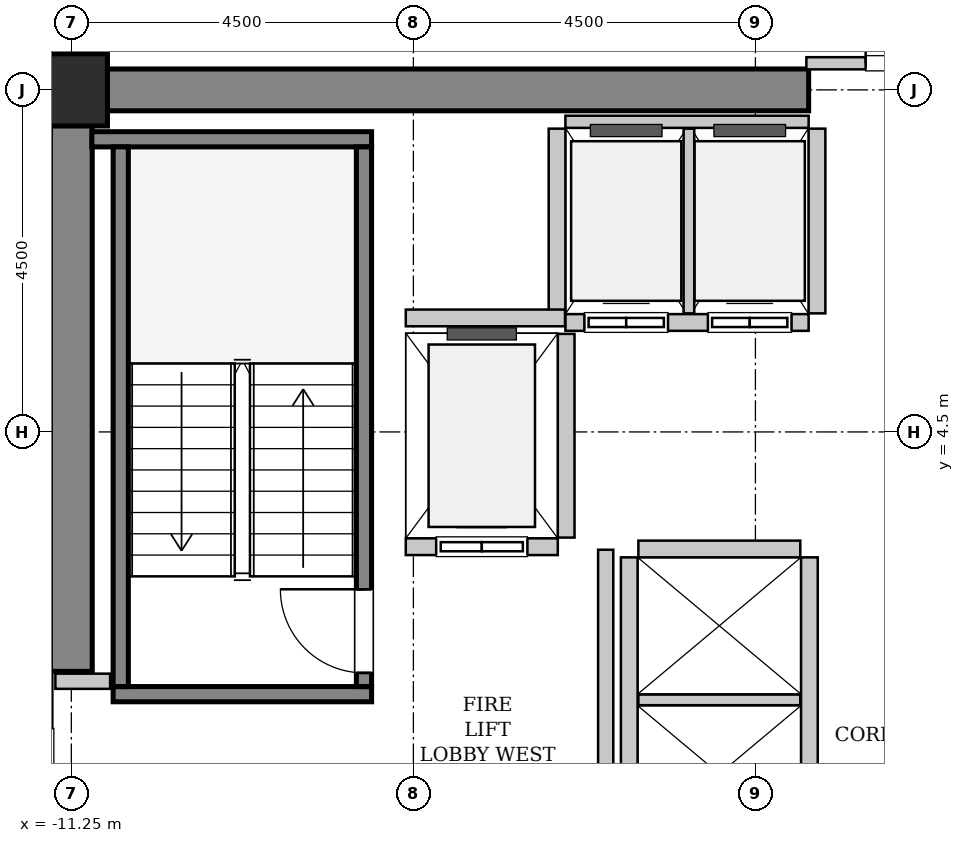
"""IFC4 building model, lengths in metres.
Left out: names, types, materials, properties, quantities, classifications, styles, units other than length and angle.
Written with IfcOpenShell. Run it as: python <this file> out.ifc"""

import sys

from ifc_helpers import new_model, si_unit, direction, frame, frame_2d, origin, origin_2d, place, context, subcontext, project, spatial, rectangle, hollow_rectangle, extrude, source, transform, mapped, element, fill, save


model = new_model("IFC4")
c1 = context("Model", 3, precision=1e-05, world=origin(), true_north=direction((0.0, 1.0)))
c2 = subcontext(c1, "Body", "Model", "MODEL_VIEW")
j1 = project(units=[si_unit("LENGTHUNIT", "METRE"), si_unit("PLANEANGLEUNIT", "RADIAN")], contexts=[c1])
p1 = place(None, origin())
s1 = spatial("IfcSite", under=j1, at=p1, CompositionType="ELEMENT")
p2 = place(p1, origin())
s2 = spatial("IfcBuilding", under=s1, at=p2, CompositionType="ELEMENT")
p3 = place(p2, frame((0.0, 0.0, 94.6)))
s3 = spatial("IfcBuildingStorey", under=s2, at=p3, CompositionType="ELEMENT", Elevation=94.6)
m1 = source(origin(), c2, "Body", "SweptSolid", [
    extrude(rectangle(XDim=9.975, YDim=0.55, at=frame_2d((4.987, 0.0))), origin(), (0.0, 0.0, 1.0), 3.8),
])
p4 = place(p3, frame((-11.525, 9.0, 0.0), z_axis=(0.0, 0.0, 1.0), x_axis=(1.0, 0.0, 0.0)))
e1 = element("IfcWall", 1, at=p4, inside=s3, PredefinedType="SHEAR", context=c2, shape_type="MappedRepresentation", body=[
    mapped(m1, transform((0.0, 0.0, 0.0), x_axis=(1.0, 0.0, 0.0), y_axis=(0.0, 1.0, 0.0), z_axis=(0.0, 0.0, 1.0), scale=1.0)),
])
m2 = source(origin(), c2, "Body", "SweptSolid", [
    extrude(rectangle(XDim=7.375, YDim=0.55, at=frame_2d((3.688, 0.0))), origin(), (0.0, 0.0, 1.0), 3.8),
])
p5 = place(p3, frame((-11.25, 1.35, 0.0), z_axis=(0.0, 0.0, 1.0), x_axis=(0.0, 1.0, 0.0)))
e2 = element("IfcWall", 2, at=p5, inside=s3, PredefinedType="SHEAR", context=c2, shape_type="MappedRepresentation", body=[
    mapped(m2, transform((0.0, 0.0, 0.0), x_axis=(1.0, 0.0, 0.0), y_axis=(0.0, 1.0, 0.0), z_axis=(0.0, 0.0, 1.0), scale=1.0)),
])
m3 = source(origin(), c2, "Body", "SweptSolid", [
    extrude(hollow_rectangle(XDim=0.95, YDim=0.95, WallThickness=0.045, InnerFilletRadius=0.045, OuterFilletRadius=0.09, at=origin_2d()), origin(), (0.0, 0.0, 1.0), 3.8),
])
p6 = place(p3, frame((-11.25, 9.0, 0.0), z_axis=(0.0, 0.0, 1.0), x_axis=(1.0, 0.0, 0.0)))
e3 = element("IfcColumn", 3, at=p6, inside=s3, PredefinedType="COLUMN", context=c2, shape_type="MappedRepresentation", body=[
    mapped(m3, transform((0.0, 0.0, 0.0), x_axis=(1.0, 0.0, 0.0), y_axis=(0.0, 1.0, 0.0), z_axis=(0.0, 0.0, 1.0), scale=1.0)),
])
m4 = source(origin(), c2, "Body", "SweptSolid", [
    extrude(rectangle(XDim=3.4, YDim=0.2, at=frame_2d((1.7, 0.0))), origin(), (0.0, 0.0, 1.0), 3.8),
])
p7 = place(p3, frame((-7.3, 1.05, 0.0), z_axis=(0.0, 0.0, 1.0), x_axis=(-1.0, 0.0, 0.0)))
e4 = element("IfcWall", 4, at=p7, inside=s3, PredefinedType="SOLIDWALL", context=c2, shape_type="MappedRepresentation", body=[
    mapped(m4, transform((0.0, 0.0, 0.0), x_axis=(1.0, 0.0, 0.0), y_axis=(0.0, 1.0, 0.0), z_axis=(0.0, 0.0, 1.0), scale=1.0)),
])
m5 = source(origin(), c2, "Body", "SweptSolid", [
    extrude(rectangle(XDim=3.68, YDim=0.2, at=frame_2d((1.84, 0.0))), origin(), (0.0, 0.0, 1.0), 3.8),
])
p8 = place(p3, frame((-7.3, 8.35, 0.0), z_axis=(0.0, 0.0, 1.0), x_axis=(-1.0, 0.0, 0.0)))
e5 = element("IfcWall", 5, at=p8, inside=s3, PredefinedType="SOLIDWALL", context=c2, shape_type="MappedRepresentation", body=[
    mapped(m5, transform((0.0, 0.0, 0.0), x_axis=(1.0, 0.0, 0.0), y_axis=(0.0, 1.0, 0.0), z_axis=(0.0, 0.0, 1.0), scale=1.0)),
])
m6 = source(origin(), c2, "Body", "SweptSolid", [
    extrude(rectangle(XDim=7.1, YDim=0.2, at=frame_2d((3.55, 0.0))), origin(), (0.0, 0.0, 1.0), 3.8),
])
p9 = place(p3, frame((-7.4, 1.15, 0.0), z_axis=(0.0, 0.0, 1.0), x_axis=(0.0, 1.0, 0.0)))
e6 = element("IfcWall", 6, at=p9, inside=s3, PredefinedType="SOLIDWALL", context=c2, shape_type="MappedRepresentation", body=[
    mapped(m6, transform((0.0, 0.0, 0.0), x_axis=(1.0, 0.0, 0.0), y_axis=(0.0, 1.0, 0.0), z_axis=(0.0, 0.0, 1.0), scale=1.0)),
])
p10 = place(p9, frame((0.18, 0.0, 0.0)))
e7 = element("IfcOpeningElement", 7, at=p10, cuts=e6, PredefinedType="OPENING", context=c2, shape_type="SweptSolid", body=[
    extrude(rectangle(XDim=1.1, YDim=2.15, at=frame_2d((0.55, 1.075))), frame((0.0, 0.11, 0.0), z_axis=(0.0, -1.0, 0.0), x_axis=(1.0, 0.0, 0.0)), (0.0, 0.0, 1.0), 0.22),
])
p11 = place(p3, frame((-10.6, 1.15, 0.0), z_axis=(0.0, 0.0, 1.0), x_axis=(0.0, 1.0, 0.0)))
e8 = element("IfcWall", 8, at=p11, inside=s3, PredefinedType="SOLIDWALL", context=c2, shape_type="MappedRepresentation", body=[
    mapped(m6, transform((0.0, 0.0, 0.0), x_axis=(1.0, 0.0, 0.0), y_axis=(0.0, 1.0, 0.0), z_axis=(0.0, 0.0, 1.0), scale=1.0)),
])
m7 = source(origin(), c2, "Body", "SweptSolid", [
    extrude(rectangle(XDim=2.0, YDim=0.22, at=frame_2d((1.0, 0.0))), origin(), (0.0, 0.0, 1.0), 3.535),
])
p12 = place(p3, frame((-6.85, 2.99, 0.0), z_axis=(0.0, 0.0, 1.0), x_axis=(1.0, 0.0, 0.0)))
e9 = element("IfcWall", 9, at=p12, inside=s3, PredefinedType="SOLIDWALL", context=c2, shape_type="MappedRepresentation", body=[
    mapped(m7, transform((0.0, 0.0, 0.0), x_axis=(1.0, 0.0, 0.0), y_axis=(0.0, 1.0, 0.0), z_axis=(0.0, 0.0, 1.0), scale=1.0)),
])
p13 = place(p12, frame((0.4, 0.0, 0.0)))
e10 = element("IfcOpeningElement", 10, at=p13, cuts=e9, PredefinedType="OPENING", context=c2, shape_type="SweptSolid", body=[
    extrude(rectangle(XDim=1.2, YDim=2.2, at=frame_2d((0.6, 1.1))), frame((0.0, 0.12, 0.0), z_axis=(0.0, -1.0, 0.0), x_axis=(1.0, 0.0, 0.0)), (0.0, 0.0, 1.0), 0.24),
])
m8 = source(origin(), c2, "Body", "SweptSolid", [
    extrude(rectangle(XDim=2.68, YDim=0.22, at=frame_2d((1.34, 0.0))), origin(), (0.0, 0.0, 1.0), 3.535),
])
p14 = place(p3, frame((-4.74, 3.11, 0.0), z_axis=(0.0, 0.0, 1.0), x_axis=(0.0, 1.0, 0.0)))
e11 = element("IfcWall", 11, at=p14, inside=s3, PredefinedType="SOLIDWALL", context=c2, shape_type="MappedRepresentation", body=[
    mapped(m8, transform((0.0, 0.0, 0.0), x_axis=(1.0, 0.0, 0.0), y_axis=(0.0, 1.0, 0.0), z_axis=(0.0, 0.0, 1.0), scale=1.0)),
])
m9 = source(origin(), c2, "Body", "SweptSolid", [
    extrude(rectangle(XDim=3.2, YDim=0.22, at=frame_2d((1.6, 0.0))), origin(), (0.0, 0.0, 1.0), 3.535),
])
p15 = place(p3, frame((-4.75, 5.94, 0.0), z_axis=(0.0, 0.0, 1.0), x_axis=(1.0, 0.0, 0.0)))
e12 = element("IfcWall", 12, at=p15, inside=s3, PredefinedType="SOLIDWALL", context=c2, shape_type="MappedRepresentation", body=[
    mapped(m9, transform((0.0, 0.0, 0.0), x_axis=(1.0, 0.0, 0.0), y_axis=(0.0, 1.0, 0.0), z_axis=(0.0, 0.0, 1.0), scale=1.0)),
])
p16 = place(p15, frame((0.25, 0.0, 0.0)))
e13 = element("IfcOpeningElement", 13, at=p16, cuts=e12, PredefinedType="OPENING", context=c2, shape_type="SweptSolid", body=[
    extrude(rectangle(XDim=1.1, YDim=2.2, at=frame_2d((0.55, 1.1))), frame((0.0, 0.12, 0.0), z_axis=(0.0, -1.0, 0.0), x_axis=(1.0, 0.0, 0.0)), (0.0, 0.0, 1.0), 0.24),
])
p17 = place(p15, frame((1.875, 0.0, 0.0)))
e14 = element("IfcOpeningElement", 14, at=p17, cuts=e12, PredefinedType="OPENING", context=c2, shape_type="SweptSolid", body=[
    extrude(rectangle(XDim=1.1, YDim=2.2, at=frame_2d((0.55, 1.1))), frame((0.0, 0.12, 0.0), z_axis=(0.0, -1.0, 0.0), x_axis=(1.0, 0.0, 0.0)), (0.0, 0.0, 1.0), 0.24),
])
m10 = source(origin(), c2, "Body", "SweptSolid", [
    extrude(rectangle(XDim=3.2, YDim=0.16, at=frame_2d((1.6, 0.0))), origin(), (0.0, 0.0, 1.0), 2.425),
])
p18 = place(p3, frame((-1.55, 8.58, 0.0), z_axis=(0.0, 0.0, 1.0), x_axis=(-1.0, 0.0, 0.0)))
e15 = element("IfcWall", 15, at=p18, inside=s3, PredefinedType="PARTITIONING", context=c2, shape_type="MappedRepresentation", body=[
    mapped(m10, transform((0.0, 0.0, 0.0), x_axis=(1.0, 0.0, 0.0), y_axis=(0.0, 1.0, 0.0), z_axis=(0.0, 0.0, 1.0), scale=1.0)),
])
m11 = source(origin(), c2, "Body", "SweptSolid", [
    extrude(rectangle(XDim=2.43, YDim=0.22, at=frame_2d((1.215, 0.0))), origin(), (0.0, 0.0, 1.0), 3.535),
])
p19 = place(p3, frame((-4.86, 8.49, 0.0), z_axis=(0.0, 0.0, 1.0), x_axis=(0.0, -1.0, 0.0)))
e16 = element("IfcWall", 16, at=p19, inside=s3, PredefinedType="SOLIDWALL", context=c2, shape_type="MappedRepresentation", body=[
    mapped(m11, transform((0.0, 0.0, 0.0), x_axis=(1.0, 0.0, 0.0), y_axis=(0.0, 1.0, 0.0), z_axis=(0.0, 0.0, 1.0), scale=1.0)),
])
m12 = source(origin(), c2, "Body", "SweptSolid", [
    extrude(rectangle(XDim=2.43, YDim=0.14, at=frame_2d((1.215, 0.0))), origin(), (0.0, 0.0, 1.0), 3.535),
])
p20 = place(p3, frame((-3.125, 6.06, 0.0), z_axis=(0.0, 0.0, 1.0), x_axis=(0.0, 1.0, 0.0)))
e17 = element("IfcWall", 17, at=p20, inside=s3, PredefinedType="PARTITIONING", context=c2, shape_type="MappedRepresentation", body=[
    mapped(m12, transform((0.0, 0.0, 0.0), x_axis=(1.0, 0.0, 0.0), y_axis=(0.0, 1.0, 0.0), z_axis=(0.0, 0.0, 1.0), scale=1.0)),
])
p21 = place(p3, frame((-1.44, 6.06, 0.0), z_axis=(0.0, 0.0, 1.0), x_axis=(0.0, 1.0, 0.0)))
e18 = element("IfcWall", 18, at=p21, inside=s3, PredefinedType="SOLIDWALL", context=c2, shape_type="MappedRepresentation", body=[
    mapped(m11, transform((0.0, 0.0, 0.0), x_axis=(1.0, 0.0, 0.0), y_axis=(0.0, 1.0, 0.0), z_axis=(0.0, 0.0, 1.0), scale=1.0)),
])
m13 = source(origin(), c2, "Body", "SweptSolid", [
    extrude(rectangle(XDim=5.7, YDim=0.22, at=frame_2d((2.85, 0.0))), origin(), (0.0, 0.0, 1.0), 3.535),
])
for number, where, z_axis, x_axis in (
    (19, (-1.54, -2.85, 0.0), (0.0, 0.0, 1.0), (0.0, 1.0, 0.0)),
    (20, (-3.91, 2.85, 0.0), (0.0, 0.0, 1.0), (0.0, -1.0, 0.0)),
):
    element("IfcWall", number, at=place(p3, frame(where, z_axis=z_axis, x_axis=x_axis)), inside=s3, PredefinedType="SOLIDWALL", context=c2, shape_type="MappedRepresentation", body=[
        mapped(m13, transform((0.0, 0.0, 0.0), x_axis=(1.0, 0.0, 0.0), y_axis=(0.0, 1.0, 0.0), z_axis=(0.0, 0.0, 1.0), scale=1.0)),
    ])
m14 = source(origin(), c2, "Body", "SweptSolid", [
    extrude(rectangle(XDim=2.13, YDim=0.14, at=frame_2d((1.065, 0.0))), origin(), (0.0, 0.0, 1.0), 3.535),
])
p22 = place(p3, frame((-3.79, 0.975, 0.0), z_axis=(0.0, 0.0, 1.0), x_axis=(1.0, 0.0, 0.0)))
e21 = element("IfcWall", 21, at=p22, inside=s3, PredefinedType="PARTITIONING", context=c2, shape_type="MappedRepresentation", body=[
    mapped(m14, transform((0.0, 0.0, 0.0), x_axis=(1.0, 0.0, 0.0), y_axis=(0.0, 1.0, 0.0), z_axis=(0.0, 0.0, 1.0), scale=1.0)),
])
m15 = source(origin(), c2, "Body", "SweptSolid", [
    extrude(rectangle(XDim=2.13, YDim=0.22, at=frame_2d((1.065, 0.0))), origin(), (0.0, 0.0, 1.0), 3.535),
])
p23 = place(p3, frame((-1.66, 2.96, 0.0), z_axis=(0.0, 0.0, 1.0), x_axis=(-1.0, 0.0, 0.0)))
e22 = element("IfcWall", 22, at=p23, inside=s3, PredefinedType="SOLIDWALL", context=c2, shape_type="MappedRepresentation", body=[
    mapped(m15, transform((0.0, 0.0, 0.0), x_axis=(1.0, 0.0, 0.0), y_axis=(0.0, 1.0, 0.0), z_axis=(0.0, 0.0, 1.0), scale=1.0)),
])
m16 = source(origin(), c2, "Body", "SweptSolid", [
    extrude(rectangle(XDim=2.095, YDim=0.22, at=frame_2d((1.048, 0.0))), origin(), (0.0, 0.0, 1.0), 3.535),
])
p24 = place(p3, frame((-6.85, 6.0, 0.0), z_axis=(0.0, 0.0, 1.0), x_axis=(1.0, 0.0, 0.0)))
e23 = element("IfcWall", 23, at=p24, inside=s3, PredefinedType="SOLIDWALL", context=c2, shape_type="MappedRepresentation", body=[
    mapped(m16, transform((0.0, 0.0, 0.0), x_axis=(1.0, 0.0, 0.0), y_axis=(0.0, 1.0, 0.0), z_axis=(0.0, 0.0, 1.0), scale=1.0)),
])
m17 = source(origin(), c2, "Body", "SweptSolid", [
    extrude(rectangle(XDim=5.9, YDim=0.2, at=frame_2d((2.95, 0.0))), origin(), (0.0, 0.0, 1.0), 3.535),
])
p25 = place(p3, frame((-4.22, -2.95, 0.0), z_axis=(0.0, 0.0, 1.0), x_axis=(0.0, 1.0, 0.0)))
e24 = element("IfcWall", 24, at=p25, inside=s3, PredefinedType="PARTITIONING", context=c2, shape_type="MappedRepresentation", body=[
    mapped(m17, transform((0.0, 0.0, 0.0), x_axis=(1.0, 0.0, 0.0), y_axis=(0.0, 1.0, 0.0), z_axis=(0.0, 0.0, 1.0), scale=1.0)),
])
m18 = source(origin(), c2, "Body", "SweptSolid", [
    extrude(rectangle(XDim=0.72, YDim=0.2, at=frame_2d((0.36, 0.0))), origin(), (0.0, 0.0, 1.0), 3.535),
])
p26 = place(p3, frame((-11.46, 1.22, 0.0), z_axis=(0.0, 0.0, 1.0), x_axis=(1.0, 0.0, 0.0)))
e25 = element("IfcWall", 25, at=p26, inside=s3, PredefinedType="PARTITIONING", context=c2, shape_type="MappedRepresentation", body=[
    mapped(m18, transform((0.0, 0.0, 0.0), x_axis=(1.0, 0.0, 0.0), y_axis=(0.0, 1.0, 0.0), z_axis=(0.0, 0.0, 1.0), scale=1.0)),
])
m19 = source(origin(), c2, "Body", "SweptSolid", [
    extrude(rectangle(XDim=3.16, YDim=0.16, at=frame_2d((1.58, 0.0))), origin(), (0.0, 0.0, 1.0), 2.425),
])
p27 = place(p3, frame((-1.58, 9.35, 0.0), z_axis=(0.0, 0.0, 1.0), x_axis=(1.0, 0.0, 0.0)))
e26 = element("IfcWall", 26, at=p27, inside=s3, PredefinedType="PARTITIONING", context=c2, shape_type="MappedRepresentation", body=[
    mapped(m19, transform((0.0, 0.0, 0.0), x_axis=(1.0, 0.0, 0.0), y_axis=(0.0, 1.0, 0.0), z_axis=(0.0, 0.0, 1.0), scale=1.0)),
])
p28 = place(p27, frame((0.78, 0.0, 0.0)))
e27 = element("IfcOpeningElement", 27, at=p28, cuts=e26, PredefinedType="OPENING", context=c2, shape_type="SweptSolid", body=[
    extrude(rectangle(XDim=1.6, YDim=2.3, at=frame_2d((0.8, 1.15))), frame((0.0, 0.09, 0.0), z_axis=(0.0, -1.0, 0.0), x_axis=(1.0, 0.0, 0.0)), (0.0, 0.0, 1.0), 0.18),
])
m20 = source(origin(), c2, "Body", "SweptSolid", [
    extrude(rectangle(XDim=1.1, YDim=2.15, at=frame_2d((0.55, 1.075))), frame((0.0, 0.025, 0.0), z_axis=(0.0, -1.0, 0.0), x_axis=(1.0, 0.0, 0.0)), (0.0, 0.0, 1.0), 0.05),
])
p29 = place(p10, origin())
e28 = element("IfcDoor", 28, at=p29, inside=s3, OperationType="SINGLE_SWING_RIGHT", PredefinedType="DOOR", context=c2, shape_type="MappedRepresentation", body=[
    mapped(m20, transform((0.0, 0.0, 0.0), x_axis=(1.0, 0.0, 0.0), y_axis=(0.0, 1.0, 0.0), z_axis=(0.0, 0.0, 1.0), scale=1.0)),
])
fill(e7, e28)
m21 = source(origin(), c2, "Body", "SweptSolid", [
    extrude(rectangle(XDim=1.2, YDim=2.2, at=frame_2d((0.6, 1.1))), frame((0.0, 0.025, 0.0), z_axis=(0.0, -1.0, 0.0), x_axis=(1.0, 0.0, 0.0)), (0.0, 0.0, 1.0), 0.05),
])
p30 = place(p13, origin())
e29 = element("IfcDoor", 29, at=p30, inside=s3, OperationType="SLIDING_TO_LEFT", PredefinedType="DOOR", context=c2, shape_type="MappedRepresentation", body=[
    mapped(m21, transform((0.0, 0.0, 0.0), x_axis=(1.0, 0.0, 0.0), y_axis=(0.0, 1.0, 0.0), z_axis=(0.0, 0.0, 1.0), scale=1.0)),
])
fill(e10, e29)
m22 = source(origin(), c2, "Body", "SweptSolid", [
    extrude(rectangle(XDim=1.1, YDim=2.2, at=frame_2d((0.55, 1.1))), frame((0.0, 0.025, 0.0), z_axis=(0.0, -1.0, 0.0), x_axis=(1.0, 0.0, 0.0)), (0.0, 0.0, 1.0), 0.05),
])
p31 = place(p16, origin())
e30 = element("IfcDoor", 30, at=p31, inside=s3, OperationType="DOUBLE_DOOR_SLIDING", PredefinedType="DOOR", context=c2, shape_type="MappedRepresentation", body=[
    mapped(m22, transform((0.0, 0.0, 0.0), x_axis=(1.0, 0.0, 0.0), y_axis=(0.0, 1.0, 0.0), z_axis=(0.0, 0.0, 1.0), scale=1.0)),
])
fill(e13, e30)
p32 = place(p17, origin())
e31 = element("IfcDoor", 31, at=p32, inside=s3, OperationType="DOUBLE_DOOR_SLIDING", PredefinedType="DOOR", context=c2, shape_type="MappedRepresentation", body=[
    mapped(m22, transform((0.0, 0.0, 0.0), x_axis=(1.0, 0.0, 0.0), y_axis=(0.0, 1.0, 0.0), z_axis=(0.0, 0.0, 1.0), scale=1.0)),
])
fill(e14, e31)
m23 = source(origin(), c2, "Body", "SweptSolid", [
    extrude(rectangle(XDim=1.6, YDim=2.3, at=frame_2d((0.8, 1.15))), frame((0.0, 0.025, 0.0), z_axis=(0.0, -1.0, 0.0), x_axis=(1.0, 0.0, 0.0)), (0.0, 0.0, 1.0), 0.05),
])
p33 = place(p28, origin())
e32 = element("IfcDoor", 32, at=p33, inside=s3, OperationType="DOUBLE_DOOR_SINGLE_SWING", PredefinedType="DOOR", context=c2, shape_type="MappedRepresentation", body=[
    mapped(m23, transform((0.0, 0.0, 0.0), x_axis=(1.0, 0.0, 0.0), y_axis=(0.0, 1.0, 0.0), z_axis=(0.0, 0.0, 1.0), scale=1.0)),
])
fill(e27, e32)
save(model, sys.argv[1])
